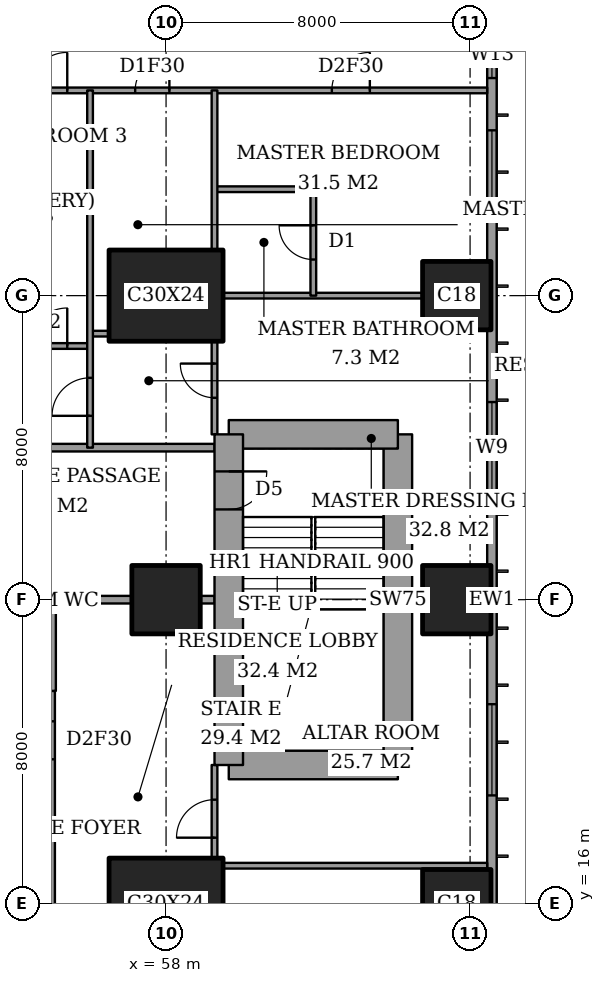
"""IFC4 building model, lengths in metres.
Left out: names, types, materials, properties, quantities, classifications, styles, units other than length and angle.
Written with IfcOpenShell. Run it as: python <this file> out.ifc"""

import sys

from ifc_helpers import new_model, si_unit, direction, frame, frame_2d, origin, origin_2d, place, context, subcontext, project, spatial, rectangle, extrude, element, fill, save


model = new_model("IFC4")
c1 = context("Model", 3, precision=1e-05, world=origin(), true_north=direction((0.0, 1.0)))
c2 = subcontext(c1, "Body", "Model", "MODEL_VIEW")
j1 = project(units=[si_unit("LENGTHUNIT", "METRE"), si_unit("PLANEANGLEUNIT", "RADIAN")], contexts=[c1])
p1 = place(None, origin())
s1 = spatial("IfcSite", under=j1, at=p1, CompositionType="ELEMENT")
p2 = place(p1, origin())
s2 = spatial("IfcBuilding", under=s1, at=p2, CompositionType="ELEMENT")
p3 = place(p2, frame((0.0, 0.0, 193.0)))
s3 = spatial("IfcBuildingStorey", under=s2, at=p3, CompositionType="ELEMENT", Elevation=193.0)
p4 = place(p3, frame((58.0, 16.0, 0.0), z_axis=(0.0, 0.0, 1.0), x_axis=(1.0, 0.0, 0.0)))
e1 = element("IfcColumn", 1, at=p4, inside=s3, PredefinedType="COLUMN", context=c2, shape_type="SweptSolid", body=[
    extrude(rectangle(XDim=3.0, YDim=2.4, at=origin_2d()), origin(), (0.0, 0.0, 1.0), 3.6),
])
p5 = place(p3, frame((58.0, 24.0, 0.0), z_axis=(0.0, 0.0, 1.0), x_axis=(1.0, 0.0, 0.0)))
e2 = element("IfcColumn", 2, at=p5, inside=s3, PredefinedType="COLUMN", context=c2, shape_type="SweptSolid", body=[
    extrude(rectangle(XDim=1.8, YDim=1.8, at=origin_2d()), origin(), (0.0, 0.0, 1.0), 3.6),
])
p6 = place(p3, frame((58.0, 32.0, 0.0), z_axis=(0.0, 0.0, 1.0), x_axis=(1.0, 0.0, 0.0)))
e3 = element("IfcColumn", 3, at=p6, inside=s3, PredefinedType="COLUMN", context=c2, shape_type="SweptSolid", body=[
    extrude(rectangle(XDim=3.0, YDim=2.4, at=origin_2d()), origin(), (0.0, 0.0, 1.0), 3.6),
])
for number, where, z_axis, x_axis in (
    (4, (65.65, 16.0, 0.0), (0.0, 0.0, 1.0), (1.0, 0.0, 0.0)),
    (5, (65.65, 24.0, 0.0), (0.0, 0.0, 1.0), (1.0, 0.0, 0.0)),
    (6, (65.65, 32.0, 0.0), (0.0, 0.0, 1.0), (1.0, 0.0, 0.0)),
):
    element("IfcColumn", number, at=place(p3, frame(where, z_axis=z_axis, x_axis=x_axis)), inside=s3, PredefinedType="COLUMN", context=c2, shape_type="SweptSolid", body=[
        extrude(rectangle(XDim=1.8, YDim=1.8, at=origin_2d()), origin(), (0.0, 0.0, 1.0), 3.6),
    ])
p7 = place(p3, frame((59.65, 19.65, 0.0), z_axis=(0.0, 0.0, 1.0), x_axis=(1.0, 0.0, 0.0)))
e7 = element("IfcWall", 7, at=p7, inside=s3, PredefinedType="SHEAR", context=c2, shape_type="SweptSolid", body=[
    extrude(rectangle(XDim=4.45, YDim=0.75, at=frame_2d((2.225, 0.0))), origin(), (0.0, 0.0, 1.0), 3.6),
])
p8 = place(p3, frame((64.1, 19.65, 0.0), z_axis=(0.0, 0.0, 1.0), x_axis=(0.0, 1.0, 0.0)))
e8 = element("IfcWall", 8, at=p8, inside=s3, PredefinedType="SHEAR", context=c2, shape_type="SweptSolid", body=[
    extrude(rectangle(XDim=8.7, YDim=0.75, at=frame_2d((4.35, 0.0))), origin(), (0.0, 0.0, 1.0), 3.6),
])
p9 = place(p3, frame((64.1, 28.35, 0.0), z_axis=(0.0, 0.0, 1.0), x_axis=(-1.0, 0.0, 0.0)))
e9 = element("IfcWall", 9, at=p9, inside=s3, PredefinedType="SHEAR", context=c2, shape_type="SweptSolid", body=[
    extrude(rectangle(XDim=4.45, YDim=0.75, at=frame_2d((2.225, 0.0))), origin(), (0.0, 0.0, 1.0), 3.6),
])
p10 = place(p3, frame((59.65, 28.35, 0.0), z_axis=(0.0, 0.0, 1.0), x_axis=(0.0, -1.0, 0.0)))
e10 = element("IfcWall", 10, at=p10, inside=s3, PredefinedType="SHEAR", context=c2, shape_type="SweptSolid", body=[
    extrude(rectangle(XDim=8.7, YDim=0.75, at=frame_2d((4.35, 0.0))), origin(), (0.0, 0.0, 1.0), 3.6),
])
p11 = place(p10, frame((0.975, 0.0, 0.0)))
e11 = element("IfcOpeningElement", 11, at=p11, cuts=e10, PredefinedType="OPENING", context=c2, shape_type="SweptSolid", body=[
    extrude(rectangle(XDim=1.0, YDim=2.1, at=frame_2d((0.5, 1.05))), frame((0.0, 0.385, 0.0), z_axis=(0.0, -1.0, 0.0), x_axis=(1.0, 0.0, 0.0)), (0.0, 0.0, 1.0), 0.77),
])
p12 = place(p3, frame((66.575, 3.175, 0.0), z_axis=(0.0, 0.0, 1.0), x_axis=(0.0, 1.0, 0.0)))
e12 = element("IfcWall", 12, at=p12, inside=s3, PredefinedType="SOLIDWALL", context=c2, shape_type="SweptSolid", body=[
    extrude(rectangle(XDim=41.65, YDim=0.25, at=frame_2d((20.825, 0.0))), origin(), (0.0, 0.0, 1.0), 3.6),
])
p13 = place(p12, frame((0.825, 0.0, 0.2)))
e13 = element("IfcOpeningElement", 13, at=p13, cuts=e12, PredefinedType="OPENING", context=c2, shape_type="SweptSolid", body=[
    extrude(rectangle(XDim=2.4, YDim=2.4, at=frame_2d((1.2, 1.2))), frame((0.0, 0.135, 0.0), z_axis=(0.0, -1.0, 0.0), x_axis=(1.0, 0.0, 0.0)), (0.0, 0.0, 1.0), 0.27),
])
p14 = place(p12, frame((6.05, 0.0, 0.2)))
e14 = element("IfcOpeningElement", 14, at=p14, cuts=e12, PredefinedType="OPENING", context=c2, shape_type="SweptSolid", body=[
    extrude(rectangle(XDim=1.2, YDim=2.4, at=frame_2d((0.6, 1.2))), frame((0.0, 0.135, 0.0), z_axis=(0.0, -1.0, 0.0), x_axis=(1.0, 0.0, 0.0)), (0.0, 0.0, 1.0), 0.27),
])
p15 = place(p12, frame((8.475, 0.0, 0.2)))
e15 = element("IfcOpeningElement", 15, at=p15, cuts=e12, PredefinedType="OPENING", context=c2, shape_type="SweptSolid", body=[
    extrude(rectangle(XDim=2.4, YDim=2.4, at=frame_2d((1.2, 1.2))), frame((0.0, 0.135, 0.0), z_axis=(0.0, -1.0, 0.0), x_axis=(1.0, 0.0, 0.0)), (0.0, 0.0, 1.0), 0.27),
])
p16 = place(p12, frame((15.675, 0.0, 0.2)))
e16 = element("IfcOpeningElement", 16, at=p16, cuts=e12, PredefinedType="OPENING", context=c2, shape_type="SweptSolid", body=[
    extrude(rectangle(XDim=2.4, YDim=2.4, at=frame_2d((1.2, 1.2))), frame((0.0, 0.135, 0.0), z_axis=(0.0, -1.0, 0.0), x_axis=(1.0, 0.0, 0.0)), (0.0, 0.0, 1.0), 0.27),
])
p17 = place(p12, frame((23.625, 0.0, 0.2)))
e17 = element("IfcOpeningElement", 17, at=p17, cuts=e12, PredefinedType="OPENING", context=c2, shape_type="SweptSolid", body=[
    extrude(rectangle(XDim=2.4, YDim=2.4, at=frame_2d((1.2, 1.2))), frame((0.0, 0.135, 0.0), z_axis=(0.0, -1.0, 0.0), x_axis=(1.0, 0.0, 0.0)), (0.0, 0.0, 1.0), 0.27),
])
p18 = place(p12, frame((30.775, 0.0, 0.2)))
e18 = element("IfcOpeningElement", 18, at=p18, cuts=e12, PredefinedType="OPENING", context=c2, shape_type="SweptSolid", body=[
    extrude(rectangle(XDim=2.4, YDim=2.4, at=frame_2d((1.2, 1.2))), frame((0.0, 0.135, 0.0), z_axis=(0.0, -1.0, 0.0), x_axis=(1.0, 0.0, 0.0)), (0.0, 0.0, 1.0), 0.27),
])
p19 = place(p12, frame((34.55, 0.0, 0.2)))
e19 = element("IfcOpeningElement", 19, at=p19, cuts=e12, PredefinedType="OPENING", context=c2, shape_type="SweptSolid", body=[
    extrude(rectangle(XDim=1.2, YDim=2.4, at=frame_2d((0.6, 1.2))), frame((0.0, 0.135, 0.0), z_axis=(0.0, -1.0, 0.0), x_axis=(1.0, 0.0, 0.0)), (0.0, 0.0, 1.0), 0.27),
])
p20 = place(p12, frame((38.425, 0.0, 0.2)))
e20 = element("IfcOpeningElement", 20, at=p20, cuts=e12, PredefinedType="OPENING", context=c2, shape_type="SweptSolid", body=[
    extrude(rectangle(XDim=2.4, YDim=2.4, at=frame_2d((1.2, 1.2))), frame((0.0, 0.135, 0.0), z_axis=(0.0, -1.0, 0.0), x_axis=(1.0, 0.0, 0.0)), (0.0, 0.0, 1.0), 0.27),
])
p21 = place(p3, frame((59.5, 17.0, 0.0), z_axis=(0.0, 0.0, 1.0), x_axis=(1.0, 0.0, 0.0)))
e21 = element("IfcWall", 21, at=p21, inside=s3, PredefinedType="PARTITIONING", context=c2, shape_type="SweptSolid", body=[
    extrude(rectangle(XDim=6.95, YDim=0.15, at=frame_2d((3.475, 0.0))), origin(), (0.0, 0.0, 1.0), 3.35),
])
p22 = place(p3, frame((50.9, 24.0, 0.0), z_axis=(0.0, 0.0, 1.0), x_axis=(1.0, 0.0, 0.0)))
e22 = element("IfcWall", 22, at=p22, inside=s3, PredefinedType="PARTITIONING", context=c2, shape_type="SweptSolid", body=[
    extrude(rectangle(XDim=6.2, YDim=0.2, at=frame_2d((3.1, 0.0))), origin(), (0.0, 0.0, 1.0), 3.35),
])
p23 = place(p3, frame((58.9, 24.0, 0.0), z_axis=(0.0, 0.0, 1.0), x_axis=(1.0, 0.0, 0.0)))
e23 = element("IfcWall", 23, at=p23, inside=s3, PredefinedType="PARTITIONING", context=c2, shape_type="SweptSolid", body=[
    extrude(rectangle(XDim=0.375, YDim=0.2, at=frame_2d((0.188, 0.0))), origin(), (0.0, 0.0, 1.0), 3.35),
])
p24 = place(p3, frame((42.0, 28.0, 0.0), z_axis=(0.0, 0.0, 1.0), x_axis=(1.0, 0.0, 0.0)))
e24 = element("IfcWall", 24, at=p24, inside=s3, PredefinedType="PARTITIONING", context=c2, shape_type="SweptSolid", body=[
    extrude(rectangle(XDim=17.275, YDim=0.2, at=frame_2d((8.637, 0.0))), origin(), (0.0, 0.0, 1.0), 3.35),
])
p25 = place(p24, frame((9.4, 0.0, 0.0)))
e25 = element("IfcOpeningElement", 25, at=p25, cuts=e24, PredefinedType="OPENING", context=c2, shape_type="SweptSolid", body=[
    extrude(rectangle(XDim=1.2, YDim=2.4, at=frame_2d((0.6, 1.2))), frame((0.0, 0.11, 0.0), z_axis=(0.0, -1.0, 0.0), x_axis=(1.0, 0.0, 0.0)), (0.0, 0.0, 1.0), 0.22),
])
p26 = place(p3, frame((51.6, 30.675, 0.0), z_axis=(0.0, 0.0, 1.0), x_axis=(1.0, 0.0, 0.0)))
e26 = element("IfcWall", 26, at=p26, inside=s3, PredefinedType="PARTITIONING", context=c2, shape_type="SweptSolid", body=[
    extrude(rectangle(XDim=4.4, YDim=0.15, at=frame_2d((2.2, 0.0))), origin(), (0.0, 0.0, 1.0), 3.35),
])
p27 = place(p26, frame((2.8, 0.0, 0.0)))
e27 = element("IfcOpeningElement", 27, at=p27, cuts=e26, PredefinedType="OPENING", context=c2, shape_type="SweptSolid", body=[
    extrude(rectangle(XDim=1.0, YDim=2.1, at=frame_2d((0.5, 1.05))), frame((0.0, 0.085, 0.0), z_axis=(0.0, -1.0, 0.0), x_axis=(1.0, 0.0, 0.0)), (0.0, 0.0, 1.0), 0.17),
])
p28 = place(p3, frame((56.0, 31.0, 0.0), z_axis=(0.0, 0.0, 1.0), x_axis=(1.0, 0.0, 0.0)))
e28 = element("IfcWall", 28, at=p28, inside=s3, PredefinedType="PARTITIONING", context=c2, shape_type="SweptSolid", body=[
    extrude(rectangle(XDim=0.5, YDim=0.15, at=frame_2d((0.25, 0.0))), origin(), (0.0, 0.0, 1.0), 3.35),
])
p29 = place(p3, frame((59.5, 32.0, 0.0), z_axis=(0.0, 0.0, 1.0), x_axis=(1.0, 0.0, 0.0)))
e29 = element("IfcWall", 29, at=p29, inside=s3, PredefinedType="PARTITIONING", context=c2, shape_type="SweptSolid", body=[
    extrude(rectangle(XDim=5.25, YDim=0.15, at=frame_2d((2.625, 0.0))), origin(), (0.0, 0.0, 1.0), 2.634),
])
p30 = place(p3, frame((59.275, 34.8, 0.0), z_axis=(0.0, 0.0, 1.0), x_axis=(1.0, 0.0, 0.0)))
e30 = element("IfcWall", 30, at=p30, inside=s3, PredefinedType="PARTITIONING", context=c2, shape_type="SweptSolid", body=[
    extrude(rectangle(XDim=2.6, YDim=0.15, at=frame_2d((1.3, 0.0))), origin(), (0.0, 0.0, 1.0), 3.35),
])
p31 = place(p3, frame((41.439, 37.4, 0.0), z_axis=(0.0, 0.0, 1.0), x_axis=(1.0, 0.0, 0.0)))
e31 = element("IfcWall", 31, at=p31, inside=s3, PredefinedType="PARTITIONING", context=c2, shape_type="SweptSolid", body=[
    extrude(rectangle(XDim=25.011, YDim=0.15, at=frame_2d((12.505, 0.0))), origin(), (0.0, 0.0, 1.0), 3.35),
])
p32 = place(p31, frame((12.961, 0.0, 0.0)))
e32 = element("IfcOpeningElement", 32, at=p32, cuts=e31, PredefinedType="OPENING", context=c2, shape_type="SweptSolid", body=[
    extrude(rectangle(XDim=1.0, YDim=2.1, at=frame_2d((0.5, 1.05))), frame((0.0, 0.085, 0.0), z_axis=(0.0, -1.0, 0.0), x_axis=(1.0, 0.0, 0.0)), (0.0, 0.0, 1.0), 0.17),
])
p33 = place(p31, frame((20.924, 0.0, 0.0)))
e33 = element("IfcOpeningElement", 33, at=p33, cuts=e31, PredefinedType="OPENING", context=c2, shape_type="SweptSolid", body=[
    extrude(rectangle(XDim=1.0, YDim=2.1, at=frame_2d((0.5, 1.05))), frame((0.0, 0.085, 0.0), z_axis=(0.0, -1.0, 0.0), x_axis=(1.0, 0.0, 0.0)), (0.0, 0.0, 1.0), 0.17),
])
p34 = place(p31, frame((15.749, 0.0, 0.0)))
e34 = element("IfcOpeningElement", 34, at=p34, cuts=e31, PredefinedType="OPENING", context=c2, shape_type="SweptSolid", body=[
    extrude(rectangle(XDim=0.9, YDim=2.1, at=frame_2d((0.45, 1.05))), frame((0.0, 0.085, 0.0), z_axis=(0.0, -1.0, 0.0), x_axis=(1.0, 0.0, 0.0)), (0.0, 0.0, 1.0), 0.17),
])
p35 = place(p31, frame((8.961, 0.0, 0.0)))
e35 = element("IfcOpeningElement", 35, at=p35, cuts=e31, PredefinedType="OPENING", context=c2, shape_type="SweptSolid", body=[
    extrude(rectangle(XDim=1.0, YDim=2.1, at=frame_2d((0.5, 1.05))), frame((0.0, 0.085, 0.0), z_axis=(0.0, -1.0, 0.0), x_axis=(1.0, 0.0, 0.0)), (0.0, 0.0, 1.0), 0.17),
])
p36 = place(p31, frame((2.836, 0.0, 0.0)))
e36 = element("IfcOpeningElement", 36, at=p36, cuts=e31, PredefinedType="OPENING", context=c2, shape_type="SweptSolid", body=[
    extrude(rectangle(XDim=1.0, YDim=2.1, at=frame_2d((0.5, 1.05))), frame((0.0, 0.085, 0.0), z_axis=(0.0, -1.0, 0.0), x_axis=(1.0, 0.0, 0.0)), (0.0, 0.0, 1.0), 0.17),
])
p37 = place(p3, frame((55.0, 21.6, 0.0), z_axis=(0.0, 0.0, 1.0), x_axis=(0.0, 1.0, 0.0)))
e37 = element("IfcWall", 37, at=p37, inside=s3, PredefinedType="PARTITIONING", context=c2, shape_type="SweptSolid", body=[
    extrude(rectangle(XDim=2.4, YDim=0.2, at=frame_2d((1.2, 0.0))), origin(), (0.0, 0.0, 1.0), 3.35),
])
p38 = place(p3, frame((55.0, 10.6, 0.0), z_axis=(0.0, 0.0, 1.0), x_axis=(0.0, 1.0, 0.0)))
e38 = element("IfcWall", 38, at=p38, inside=s3, PredefinedType="PARTITIONING", context=c2, shape_type="SweptSolid", body=[
    extrude(rectangle(XDim=11.0, YDim=0.15, at=frame_2d((5.5, 0.0))), origin(), (0.0, 0.0, 1.0), 3.35),
])
p39 = place(p38, frame((9.2, 0.0, 0.0)))
e39 = element("IfcOpeningElement", 39, at=p39, cuts=e38, PredefinedType="OPENING", context=c2, shape_type="SweptSolid", body=[
    extrude(rectangle(XDim=1.0, YDim=2.1, at=frame_2d((0.5, 1.05))), frame((0.0, 0.085, 0.0), z_axis=(0.0, -1.0, 0.0), x_axis=(1.0, 0.0, 0.0)), (0.0, 0.0, 1.0), 0.17),
])
p40 = place(p3, frame((56.0, 28.0, 0.0), z_axis=(0.0, 0.0, 1.0), x_axis=(0.0, 1.0, 0.0)))
e40 = element("IfcWall", 40, at=p40, inside=s3, PredefinedType="PARTITIONING", context=c2, shape_type="SweptSolid", body=[
    extrude(rectangle(XDim=9.4, YDim=0.15, at=frame_2d((4.7, 0.0))), origin(), (0.0, 0.0, 1.0), 3.35),
])
p41 = place(p40, frame((0.837, 0.0, 0.0)))
e41 = element("IfcOpeningElement", 41, at=p41, cuts=e40, PredefinedType="OPENING", context=c2, shape_type="SweptSolid", body=[
    extrude(rectangle(XDim=1.0, YDim=2.1, at=frame_2d((0.5, 1.05))), frame((0.0, 0.085, 0.0), z_axis=(0.0, -1.0, 0.0), x_axis=(1.0, 0.0, 0.0)), (0.0, 0.0, 1.0), 0.17),
])
p42 = place(p3, frame((59.275, 17.2, 0.0), z_axis=(0.0, 0.0, 1.0), x_axis=(0.0, 1.0, 0.0)))
e42 = element("IfcWall", 42, at=p42, inside=s3, PredefinedType="PARTITIONING", context=c2, shape_type="SweptSolid", body=[
    extrude(rectangle(XDim=2.45, YDim=0.15, at=frame_2d((1.225, 0.0))), origin(), (0.0, 0.0, 1.0), 3.35),
])
p43 = place(p42, frame((0.538, 0.0, 0.0)))
e43 = element("IfcOpeningElement", 43, at=p43, cuts=e42, PredefinedType="OPENING", context=c2, shape_type="SweptSolid", body=[
    extrude(rectangle(XDim=1.0, YDim=2.1, at=frame_2d((0.5, 1.05))), frame((0.0, 0.085, 0.0), z_axis=(0.0, -1.0, 0.0), x_axis=(1.0, 0.0, 0.0)), (0.0, 0.0, 1.0), 0.17),
])
p44 = place(p3, frame((59.275, 28.35, 0.0), z_axis=(0.0, 0.0, 1.0), x_axis=(0.0, 1.0, 0.0)))
e44 = element("IfcWall", 44, at=p44, inside=s3, PredefinedType="PARTITIONING", context=c2, shape_type="SweptSolid", body=[
    extrude(rectangle(XDim=2.45, YDim=0.15, at=frame_2d((1.225, 0.0))), origin(), (0.0, 0.0, 1.0), 3.35),
])
p45 = place(p44, frame((0.962, 0.0, 0.0)))
e45 = element("IfcOpeningElement", 45, at=p45, cuts=e44, PredefinedType="OPENING", context=c2, shape_type="SweptSolid", body=[
    extrude(rectangle(XDim=0.9, YDim=2.1, at=frame_2d((0.45, 1.05))), frame((0.0, 0.085, 0.0), z_axis=(0.0, -1.0, 0.0), x_axis=(1.0, 0.0, 0.0)), (0.0, 0.0, 1.0), 0.17),
])
p46 = place(p3, frame((59.275, 33.2, 0.0), z_axis=(0.0, 0.0, 1.0), x_axis=(0.0, 1.0, 0.0)))
e46 = element("IfcWall", 46, at=p46, inside=s3, PredefinedType="PARTITIONING", context=c2, shape_type="SweptSolid", body=[
    extrude(rectangle(XDim=4.2, YDim=0.15, at=frame_2d((2.1, 0.0))), origin(), (0.0, 0.0, 1.0), 3.35),
])
p47 = place(p3, frame((61.875, 32.0, 0.0), z_axis=(0.0, 0.0, 1.0), x_axis=(0.0, 1.0, 0.0)))
e47 = element("IfcWall", 47, at=p47, inside=s3, PredefinedType="PARTITIONING", context=c2, shape_type="SweptSolid", body=[
    extrude(rectangle(XDim=2.8, YDim=0.15, at=frame_2d((1.4, 0.0))), origin(), (0.0, 0.0, 1.0), 3.35),
])
p48 = place(p47, frame((0.95, 0.0, 0.0)))
e48 = element("IfcOpeningElement", 48, at=p48, cuts=e47, PredefinedType="OPENING", context=c2, shape_type="SweptSolid", body=[
    extrude(rectangle(XDim=0.9, YDim=2.1, at=frame_2d((0.45, 1.05))), frame((0.0, 0.085, 0.0), z_axis=(0.0, -1.0, 0.0), x_axis=(1.0, 0.0, 0.0)), (0.0, 0.0, 1.0), 0.17),
])
p49 = place(p16, origin())
e49 = element("IfcWindow", 49, at=p49, inside=s3, PartitioningType="SINGLE_PANEL", PredefinedType="WINDOW", context=c2, shape_type="SweptSolid", body=[
    extrude(rectangle(XDim=2.4, YDim=2.4, at=frame_2d((1.2, 1.2))), frame((0.0, 0.03, 0.0), z_axis=(0.0, -1.0, 0.0), x_axis=(1.0, 0.0, 0.0)), (0.0, 0.0, 1.0), 0.06),
])
fill(e16, e49)
p50 = place(p17, origin())
e50 = element("IfcWindow", 50, at=p50, inside=s3, PartitioningType="SINGLE_PANEL", PredefinedType="WINDOW", context=c2, shape_type="SweptSolid", body=[
    extrude(rectangle(XDim=2.4, YDim=2.4, at=frame_2d((1.2, 1.2))), frame((0.0, 0.03, 0.0), z_axis=(0.0, -1.0, 0.0), x_axis=(1.0, 0.0, 0.0)), (0.0, 0.0, 1.0), 0.06),
])
fill(e17, e50)
p51 = place(p18, origin())
e51 = element("IfcWindow", 51, at=p51, inside=s3, PartitioningType="SINGLE_PANEL", PredefinedType="WINDOW", context=c2, shape_type="SweptSolid", body=[
    extrude(rectangle(XDim=2.4, YDim=2.4, at=frame_2d((1.2, 1.2))), frame((0.0, 0.03, 0.0), z_axis=(0.0, -1.0, 0.0), x_axis=(1.0, 0.0, 0.0)), (0.0, 0.0, 1.0), 0.06),
])
fill(e18, e51)
p52 = place(p19, origin())
e52 = element("IfcWindow", 52, at=p52, inside=s3, PartitioningType="SINGLE_PANEL", PredefinedType="WINDOW", context=c2, shape_type="SweptSolid", body=[
    extrude(rectangle(XDim=1.2, YDim=2.4, at=frame_2d((0.6, 1.2))), frame((0.0, 0.03, 0.0), z_axis=(0.0, -1.0, 0.0), x_axis=(1.0, 0.0, 0.0)), (0.0, 0.0, 1.0), 0.06),
])
fill(e19, e52)
p53 = place(p43, origin())
e53 = element("IfcDoor", 53, at=p53, inside=s3, OperationType="SINGLE_SWING_RIGHT", PredefinedType="DOOR", context=c2, shape_type="SweptSolid", body=[
    extrude(rectangle(XDim=1.0, YDim=2.1, at=frame_2d((0.5, 1.05))), frame((0.0, 0.025, 0.0), z_axis=(0.0, -1.0, 0.0), x_axis=(1.0, 0.0, 0.0)), (0.0, 0.0, 1.0), 0.05),
])
fill(e43, e53)
p54 = place(p39, origin())
e54 = element("IfcDoor", 54, at=p54, inside=s3, OperationType="SINGLE_SWING_LEFT", PredefinedType="DOOR", context=c2, shape_type="SweptSolid", body=[
    extrude(rectangle(XDim=1.0, YDim=2.1, at=frame_2d((0.5, 1.05))), frame((0.0, 0.025, 0.0), z_axis=(0.0, -1.0, 0.0), x_axis=(1.0, 0.0, 0.0)), (0.0, 0.0, 1.0), 0.05),
])
fill(e39, e54)
p55 = place(p32, origin())
e55 = element("IfcDoor", 55, at=p55, inside=s3, OperationType="SINGLE_SWING_LEFT", PredefinedType="DOOR", context=c2, shape_type="SweptSolid", body=[
    extrude(rectangle(XDim=1.0, YDim=2.1, at=frame_2d((0.5, 1.05))), frame((0.0, 0.025, 0.0), z_axis=(0.0, -1.0, 0.0), x_axis=(1.0, 0.0, 0.0)), (0.0, 0.0, 1.0), 0.05),
])
fill(e32, e55)
p56 = place(p48, origin())
e56 = element("IfcDoor", 56, at=p56, inside=s3, OperationType="SINGLE_SWING_LEFT", PredefinedType="DOOR", context=c2, shape_type="SweptSolid", body=[
    extrude(rectangle(XDim=0.9, YDim=2.1, at=frame_2d((0.45, 1.05))), frame((0.0, 0.025, 0.0), z_axis=(0.0, -1.0, 0.0), x_axis=(1.0, 0.0, 0.0)), (0.0, 0.0, 1.0), 0.05),
])
fill(e48, e56)
p57 = place(p33, origin())
e57 = element("IfcDoor", 57, at=p57, inside=s3, OperationType="SINGLE_SWING_LEFT", PredefinedType="DOOR", context=c2, shape_type="SweptSolid", body=[
    extrude(rectangle(XDim=1.0, YDim=2.1, at=frame_2d((0.5, 1.05))), frame((0.0, 0.025, 0.0), z_axis=(0.0, -1.0, 0.0), x_axis=(1.0, 0.0, 0.0)), (0.0, 0.0, 1.0), 0.05),
])
fill(e33, e57)
p58 = place(p45, origin())
e58 = element("IfcDoor", 58, at=p58, inside=s3, OperationType="SINGLE_SWING_LEFT", PredefinedType="DOOR", context=c2, shape_type="SweptSolid", body=[
    extrude(rectangle(XDim=0.9, YDim=2.1, at=frame_2d((0.45, 1.05))), frame((0.0, 0.025, 0.0), z_axis=(0.0, -1.0, 0.0), x_axis=(1.0, 0.0, 0.0)), (0.0, 0.0, 1.0), 0.05),
])
fill(e45, e58)
p59 = place(p34, origin())
e59 = element("IfcDoor", 59, at=p59, inside=s3, OperationType="SINGLE_SWING_LEFT", PredefinedType="DOOR", context=c2, shape_type="SweptSolid", body=[
    extrude(rectangle(XDim=0.9, YDim=2.1, at=frame_2d((0.45, 1.05))), frame((0.0, 0.025, 0.0), z_axis=(0.0, -1.0, 0.0), x_axis=(1.0, 0.0, 0.0)), (0.0, 0.0, 1.0), 0.05),
])
fill(e34, e59)
p60 = place(p41, origin())
e60 = element("IfcDoor", 60, at=p60, inside=s3, OperationType="SINGLE_SWING_RIGHT", PredefinedType="DOOR", context=c2, shape_type="SweptSolid", body=[
    extrude(rectangle(XDim=1.0, YDim=2.1, at=frame_2d((0.5, 1.05))), frame((0.0, 0.025, 0.0), z_axis=(0.0, -1.0, 0.0), x_axis=(1.0, 0.0, 0.0)), (0.0, 0.0, 1.0), 0.05),
])
fill(e41, e60)
p61 = place(p27, origin())
e61 = element("IfcDoor", 61, at=p61, inside=s3, OperationType="SINGLE_SWING_LEFT", PredefinedType="DOOR", context=c2, shape_type="SweptSolid", body=[
    extrude(rectangle(XDim=1.0, YDim=2.1, at=frame_2d((0.5, 1.05))), frame((0.0, 0.025, 0.0), z_axis=(0.0, -1.0, 0.0), x_axis=(1.0, 0.0, 0.0)), (0.0, 0.0, 1.0), 0.05),
])
fill(e27, e61)
p62 = place(p11, origin())
e62 = element("IfcDoor", 62, at=p62, inside=s3, OperationType="SINGLE_SWING_RIGHT", PredefinedType="DOOR", context=c2, shape_type="SweptSolid", body=[
    extrude(rectangle(XDim=1.0, YDim=2.1, at=frame_2d((0.5, 1.05))), frame((0.0, 0.025, 0.0), z_axis=(0.0, -1.0, 0.0), x_axis=(1.0, 0.0, 0.0)), (0.0, 0.0, 1.0), 0.05),
])
fill(e11, e62)
save(model, sys.argv[1])
